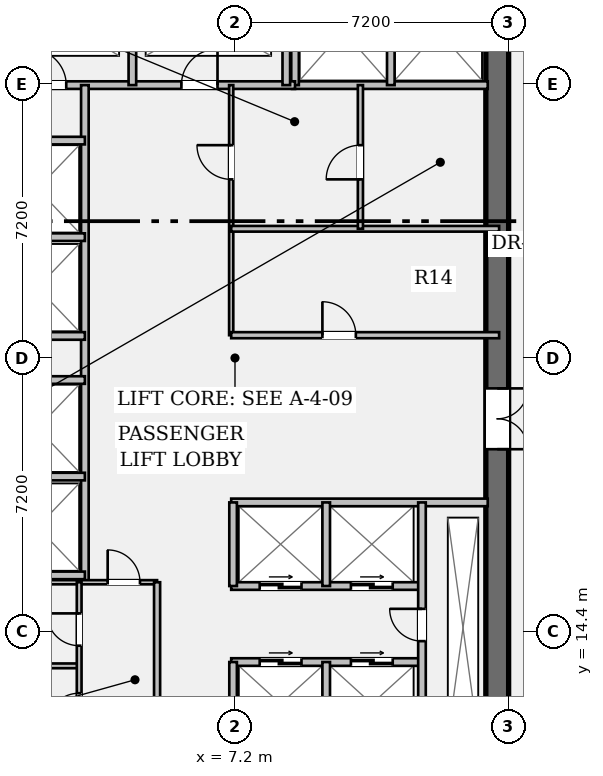
"""IFC4 building model, lengths in metres.
Left out: names, types, materials, properties, quantities, classifications, styles, units other than length and angle.
Written with IfcOpenShell. Run it as: python <this file> out.ifc"""

import sys

from ifc_helpers import new_model, si_unit, direction, frame, frame_2d, origin, place, context, subcontext, project, spatial, rectangle, extrude, element, fill, save


model = new_model("IFC4")
c1 = context("Model", 3, precision=1e-05, world=origin(), true_north=direction((0.0, 1.0)))
c2 = subcontext(c1, "Body", "Model", "MODEL_VIEW")
j1 = project(units=[si_unit("LENGTHUNIT", "METRE"), si_unit("PLANEANGLEUNIT", "RADIAN")], contexts=[c1])
p1 = place(None, origin())
s1 = spatial("IfcSite", under=j1, at=p1, CompositionType="ELEMENT")
p2 = place(p1, origin())
s2 = spatial("IfcBuilding", under=s1, at=p2, CompositionType="ELEMENT")
p3 = place(p2, frame((0.0, 0.0, 136.85)))
s3 = spatial("IfcBuildingStorey", under=s2, at=p3, CompositionType="ELEMENT", Elevation=136.85)
p4 = place(p3, frame((14.1, 35.4, 0.0), z_axis=(0.0, 0.0, 1.0), x_axis=(0.0, -1.0, 0.0)))
e1 = element("IfcWall", 1, at=p4, inside=s3, PredefinedType="SHEAR", context=c2, shape_type="SweptSolid", body=[
    extrude(rectangle(XDim=27.6, YDim=0.6, at=frame_2d((13.8, 0.0))), origin(), (0.0, 0.0, 1.0), 3.58),
])
p5 = place(p4, frame((1.3, 0.0, 0.0)))
e2 = element("IfcOpeningElement", 2, at=p5, cuts=e1, PredefinedType="OPENING", context=c2, shape_type="SweptSolid", body=[
    extrude(rectangle(XDim=1.2, YDim=2.15, at=frame_2d((0.6, 1.075))), frame((0.0, 0.312, 0.0), z_axis=(0.0, -1.0, 0.0), x_axis=(1.0, 0.0, 0.0)), (0.0, 0.0, 1.0), 0.624),
])
p6 = place(p4, frame((25.25, 0.0, 0.0)))
e3 = element("IfcOpeningElement", 3, at=p6, cuts=e1, PredefinedType="OPENING", context=c2, shape_type="SweptSolid", body=[
    extrude(rectangle(XDim=1.2, YDim=2.15, at=frame_2d((0.6, 1.075))), frame((0.0, 0.312, 0.0), z_axis=(0.0, -1.0, 0.0), x_axis=(1.0, 0.0, 0.0)), (0.0, 0.0, 1.0), 0.624),
])
p7 = place(p4, frame((14.6, 0.0, 0.0)))
e4 = element("IfcOpeningElement", 4, at=p7, cuts=e1, PredefinedType="OPENING", context=c2, shape_type="SweptSolid", body=[
    extrude(rectangle(XDim=1.6, YDim=2.2, at=frame_2d((0.8, 1.1))), frame((0.0, 0.312, 0.0), z_axis=(0.0, -1.0, 0.0), x_axis=(1.0, 0.0, 0.0)), (0.0, 0.0, 1.0), 0.624),
])
p8 = place(p3, frame((8.7, 28.78, 0.0), z_axis=(0.0, 0.0, 1.0), x_axis=(1.0, 0.0, 0.0)))
e5 = element("IfcWall", 5, at=p8, inside=s3, PredefinedType="PARTITIONING", context=c2, shape_type="SweptSolid", body=[
    extrude(rectangle(XDim=5.15, YDim=0.2, at=frame_2d((2.575, 0.0))), origin(), (0.0, 0.0, 1.0), 3.58),
])
for number, where, z_axis, x_axis in (
    (6, (8.78, 28.78, 0.0), (0.0, 0.0, 1.0), (0.0, 1.0, 0.0)),
    (7, (11.3, 28.78, 0.0), (0.0, 0.0, 1.0), (0.0, 1.0, 0.0)),
):
    element("IfcWall", number, at=place(p3, frame(where, z_axis=z_axis, x_axis=x_axis)), inside=s3, PredefinedType="PARTITIONING", context=c2, shape_type="SweptSolid", body=[
        extrude(rectangle(XDim=3.1, YDim=0.2, at=frame_2d((1.55, 0.0))), origin(), (0.0, 0.0, 1.0), 3.58),
    ])
p9 = place(p3, frame((0.6, 28.78, 0.0), z_axis=(0.0, 0.0, 1.0), x_axis=(1.0, 0.0, 0.0)))
e8 = element("IfcWall", 8, at=p9, inside=s3, PredefinedType="PARTITIONING", context=c2, shape_type="SweptSolid", body=[
    extrude(rectangle(XDim=8.18, YDim=0.2, at=frame_2d((4.09, 0.0))), origin(), (0.0, 0.0, 1.0), 3.58),
])
p10 = place(p9, frame((1.21, 0.0, 0.0)))
e9 = element("IfcOpeningElement", 9, at=p10, cuts=e8, PredefinedType="OPENING", context=c2, shape_type="SweptSolid", body=[
    extrude(rectangle(XDim=0.95, YDim=2.15, at=frame_2d((0.475, 1.075))), frame((0.0, 0.112, 0.0), z_axis=(0.0, -1.0, 0.0), x_axis=(1.0, 0.0, 0.0)), (0.0, 0.0, 1.0), 0.224),
])
p11 = place(p9, frame((5.19, 0.0, 0.0)))
e10 = element("IfcOpeningElement", 10, at=p11, cuts=e8, PredefinedType="OPENING", context=c2, shape_type="SweptSolid", body=[
    extrude(rectangle(XDim=0.95, YDim=2.15, at=frame_2d((0.475, 1.075))), frame((0.0, 0.112, 0.0), z_axis=(0.0, -1.0, 0.0), x_axis=(1.0, 0.0, 0.0)), (0.0, 0.0, 1.0), 0.224),
])
for number, where, z_axis, x_axis in (
    (11, (4.5, 28.78, 0.0), (0.0, 0.0, 1.0), (0.0, 1.0, 0.0)),
    (12, (8.55, 28.78, 0.0), (0.0, 0.0, 1.0), (0.0, 1.0, 0.0)),
):
    element("IfcWall", number, at=place(p3, frame(where, z_axis=z_axis, x_axis=x_axis)), inside=s3, PredefinedType="PARTITIONING", context=c2, shape_type="SweptSolid", body=[
        extrude(rectangle(XDim=2.94, YDim=0.2, at=frame_2d((1.47, 0.0))), origin(), (0.0, 0.0, 1.0), 3.58),
    ])
p12 = place(p3, frame((3.25, 15.7, 0.0), z_axis=(0.0, 0.0, 1.0), x_axis=(0.0, 1.0, 0.0)))
e13 = element("IfcWall", 13, at=p12, inside=s3, PredefinedType="PARTITIONING", context=c2, shape_type="SweptSolid", body=[
    extrude(rectangle(XDim=13.08, YDim=0.2, at=frame_2d((6.54, 0.0))), origin(), (0.0, 0.0, 1.0), 3.58),
])
for number, where, z_axis, x_axis in (
    (14, (0.6, 15.88, 0.0), (0.0, 0.0, 1.0), (1.0, 0.0, 0.0)),
    (15, (0.6, 18.48, 0.0), (0.0, 0.0, 1.0), (1.0, 0.0, 0.0)),
    (16, (0.6, 22.18, 0.0), (0.0, 0.0, 1.0), (1.0, 0.0, 0.0)),
    (17, (0.6, 24.78, 0.0), (0.0, 0.0, 1.0), (1.0, 0.0, 0.0)),
    (18, (0.6, 21.02, 0.0), (0.0, 0.0, 1.0), (1.0, 0.0, 0.0)),
    (19, (0.6, 27.32, 0.0), (0.0, 0.0, 1.0), (1.0, 0.0, 0.0)),
):
    element("IfcWall", number, at=place(p3, frame(where, z_axis=z_axis, x_axis=x_axis)), inside=s3, PredefinedType="PARTITIONING", context=c2, shape_type="SweptSolid", body=[
        extrude(rectangle(XDim=2.65, YDim=0.2, at=frame_2d((1.325, 0.0))), origin(), (0.0, 0.0, 1.0), 3.58),
    ])
p13 = place(p3, frame((7.1, 22.2, 0.0), z_axis=(0.0, 0.0, 1.0), x_axis=(0.0, 1.0, 0.0)))
e20 = element("IfcWall", 20, at=p13, inside=s3, PredefinedType="PARTITIONING", context=c2, shape_type="SweptSolid", body=[
    extrude(rectangle(XDim=6.58, YDim=0.11, at=frame_2d((3.29, 0.0))), origin(), (0.0, 0.0, 1.0), 3.58),
])
p14 = place(p13, frame((4.1, 0.0, 0.0)))
e21 = element("IfcOpeningElement", 21, at=p14, cuts=e20, PredefinedType="OPENING", context=c2, shape_type="SweptSolid", body=[
    extrude(rectangle(XDim=0.9, YDim=2.15, at=frame_2d((0.45, 1.075))), frame((0.0, 0.067, 0.0), z_axis=(0.0, -1.0, 0.0), x_axis=(1.0, 0.0, 0.0)), (0.0, 0.0, 1.0), 0.134),
])
p15 = place(p3, frame((7.1, 22.2, 0.0), z_axis=(0.0, 0.0, 1.0), x_axis=(1.0, 0.0, 0.0)))
e22 = element("IfcWall", 22, at=p15, inside=s3, PredefinedType="PARTITIONING", context=c2, shape_type="SweptSolid", body=[
    extrude(rectangle(XDim=7.05, YDim=0.16, at=frame_2d((3.525, 0.0))), origin(), (0.0, 0.0, 1.0), 3.58),
])
p16 = place(p15, frame((2.4, 0.0, 0.0)))
e23 = element("IfcOpeningElement", 23, at=p16, cuts=e22, PredefinedType="OPENING", context=c2, shape_type="SweptSolid", body=[
    extrude(rectangle(XDim=0.88, YDim=2.15, at=frame_2d((0.44, 1.075))), frame((0.0, 0.092, 0.0), z_axis=(0.0, -1.0, 0.0), x_axis=(1.0, 0.0, 0.0)), (0.0, 0.0, 1.0), 0.184),
])
p17 = place(p3, frame((7.1, 25.0, 0.0), z_axis=(0.0, 0.0, 1.0), x_axis=(1.0, 0.0, 0.0)))
e24 = element("IfcWall", 24, at=p17, inside=s3, PredefinedType="PARTITIONING", context=c2, shape_type="SweptSolid", body=[
    extrude(rectangle(XDim=7.05, YDim=0.15, at=frame_2d((3.525, 0.0))), origin(), (0.0, 0.0, 1.0), 3.58),
])
p18 = place(p3, frame((10.5, 25.0, 0.0), z_axis=(0.0, 0.0, 1.0), x_axis=(0.0, 1.0, 0.0)))
e25 = element("IfcWall", 25, at=p18, inside=s3, PredefinedType="PARTITIONING", context=c2, shape_type="SweptSolid", body=[
    extrude(rectangle(XDim=3.78, YDim=0.135, at=frame_2d((1.89, 0.0))), origin(), (0.0, 0.0, 1.0), 3.58),
])
p19 = place(p18, frame((1.3, 0.0, 0.0)))
e26 = element("IfcOpeningElement", 26, at=p19, cuts=e25, PredefinedType="OPENING", context=c2, shape_type="SweptSolid", body=[
    extrude(rectangle(XDim=0.9, YDim=2.15, at=frame_2d((0.45, 1.075))), frame((0.0, 0.08, 0.0), z_axis=(0.0, -1.0, 0.0), x_axis=(1.0, 0.0, 0.0)), (0.0, 0.0, 1.0), 0.159),
])
p20 = place(p3, frame((7.1, 17.8, 0.0), z_axis=(0.0, 0.0, 1.0), x_axis=(1.0, 0.0, 0.0)))
e27 = element("IfcWall", 27, at=p20, inside=s3, PredefinedType="PARTITIONING", context=c2, shape_type="SweptSolid", body=[
    extrude(rectangle(XDim=6.75, YDim=0.2, at=frame_2d((3.375, 0.0))), origin(), (0.0, 0.0, 1.0), 3.58),
])
p21 = place(p3, frame((7.1, 15.6, 0.0), z_axis=(0.0, 0.0, 1.0), x_axis=(1.0, 0.0, 0.0)))
e28 = element("IfcWall", 28, at=p21, inside=s3, PredefinedType="PARTITIONING", context=c2, shape_type="SweptSolid", body=[
    extrude(rectangle(XDim=5.02, YDim=0.2, at=frame_2d((2.51, 0.0))), origin(), (0.0, 0.0, 1.0), 3.58),
])
p22 = place(p21, frame((0.75, 0.0, 0.0)))
e29 = element("IfcOpeningElement", 29, at=p22, cuts=e28, PredefinedType="OPENING", context=c2, shape_type="SweptSolid", body=[
    extrude(rectangle(XDim=1.1, YDim=2.2, at=frame_2d((0.55, 1.1))), frame((0.0, 0.112, 0.0), z_axis=(0.0, -1.0, 0.0), x_axis=(1.0, 0.0, 0.0)), (0.0, 0.0, 1.0), 0.224),
])
p23 = place(p21, frame((3.15, 0.0, 0.0)))
e30 = element("IfcOpeningElement", 30, at=p23, cuts=e28, PredefinedType="OPENING", context=c2, shape_type="SweptSolid", body=[
    extrude(rectangle(XDim=1.1, YDim=2.2, at=frame_2d((0.55, 1.1))), frame((0.0, 0.112, 0.0), z_axis=(0.0, -1.0, 0.0), x_axis=(1.0, 0.0, 0.0)), (0.0, 0.0, 1.0), 0.224),
])
p24 = place(p3, frame((7.1, 13.6, 0.0), z_axis=(0.0, 0.0, 1.0), x_axis=(1.0, 0.0, 0.0)))
e31 = element("IfcWall", 31, at=p24, inside=s3, PredefinedType="PARTITIONING", context=c2, shape_type="SweptSolid", body=[
    extrude(rectangle(XDim=5.02, YDim=0.2, at=frame_2d((2.51, 0.0))), origin(), (0.0, 0.0, 1.0), 3.58),
])
p25 = place(p24, frame((0.75, 0.0, 0.0)))
e32 = element("IfcOpeningElement", 32, at=p25, cuts=e31, PredefinedType="OPENING", context=c2, shape_type="SweptSolid", body=[
    extrude(rectangle(XDim=1.1, YDim=2.2, at=frame_2d((0.55, 1.1))), frame((0.0, 0.112, 0.0), z_axis=(0.0, -1.0, 0.0), x_axis=(1.0, 0.0, 0.0)), (0.0, 0.0, 1.0), 0.224),
])
p26 = place(p24, frame((3.15, 0.0, 0.0)))
e33 = element("IfcOpeningElement", 33, at=p26, cuts=e31, PredefinedType="OPENING", context=c2, shape_type="SweptSolid", body=[
    extrude(rectangle(XDim=1.1, YDim=2.2, at=frame_2d((0.55, 1.1))), frame((0.0, 0.112, 0.0), z_axis=(0.0, -1.0, 0.0), x_axis=(1.0, 0.0, 0.0)), (0.0, 0.0, 1.0), 0.224),
])
p27 = place(p3, frame((7.15, 15.6, 0.0), z_axis=(0.0, 0.0, 1.0), x_axis=(0.0, 1.0, 0.0)))
e34 = element("IfcWall", 34, at=p27, inside=s3, PredefinedType="PARTITIONING", context=c2, shape_type="SweptSolid", body=[
    extrude(rectangle(XDim=2.2, YDim=0.2, at=frame_2d((1.1, 0.0))), origin(), (0.0, 0.0, 1.0), 3.58),
])
p28 = place(p3, frame((7.15, 11.2, 0.0), z_axis=(0.0, 0.0, 1.0), x_axis=(0.0, 1.0, 0.0)))
e35 = element("IfcWall", 35, at=p28, inside=s3, PredefinedType="PARTITIONING", context=c2, shape_type="SweptSolid", body=[
    extrude(rectangle(XDim=2.4, YDim=0.2, at=frame_2d((1.2, 0.0))), origin(), (0.0, 0.0, 1.0), 3.58),
])
p29 = place(p3, frame((9.6, 15.6, 0.0), z_axis=(0.0, 0.0, 1.0), x_axis=(0.0, 1.0, 0.0)))
e36 = element("IfcWall", 36, at=p29, inside=s3, PredefinedType="PARTITIONING", context=c2, shape_type="SweptSolid", body=[
    extrude(rectangle(XDim=2.2, YDim=0.2, at=frame_2d((1.1, 0.0))), origin(), (0.0, 0.0, 1.0), 3.58),
])
p30 = place(p3, frame((9.6, 11.2, 0.0), z_axis=(0.0, 0.0, 1.0), x_axis=(0.0, 1.0, 0.0)))
e37 = element("IfcWall", 37, at=p30, inside=s3, PredefinedType="PARTITIONING", context=c2, shape_type="SweptSolid", body=[
    extrude(rectangle(XDim=2.4, YDim=0.2, at=frame_2d((1.2, 0.0))), origin(), (0.0, 0.0, 1.0), 3.58),
])
p31 = place(p3, frame((12.12, 11.2, 0.0), z_axis=(0.0, 0.0, 1.0), x_axis=(0.0, 1.0, 0.0)))
e38 = element("IfcWall", 38, at=p31, inside=s3, PredefinedType="PARTITIONING", context=c2, shape_type="SweptSolid", body=[
    extrude(rectangle(XDim=6.6, YDim=0.2, at=frame_2d((3.3, 0.0))), origin(), (0.0, 0.0, 1.0), 3.58),
])
p32 = place(p31, frame((2.95, 0.0, 0.0)))
e39 = element("IfcOpeningElement", 39, at=p32, cuts=e38, PredefinedType="OPENING", context=c2, shape_type="SweptSolid", body=[
    extrude(rectangle(XDim=0.85, YDim=2.15, at=frame_2d((0.425, 1.075))), frame((0.0, 0.112, 0.0), z_axis=(0.0, -1.0, 0.0), x_axis=(1.0, 0.0, 0.0)), (0.0, 0.0, 1.0), 0.224),
])
p33 = place(p3, frame((0.6, 15.7, 0.0), z_axis=(0.0, 0.0, 1.0), x_axis=(1.0, 0.0, 0.0)))
e40 = element("IfcWall", 40, at=p33, inside=s3, PredefinedType="PARTITIONING", context=c2, shape_type="SweptSolid", body=[
    extrude(rectangle(XDim=4.55, YDim=0.11, at=frame_2d((2.275, 0.0))), origin(), (0.0, 0.0, 1.0), 3.58),
])
p34 = place(p33, frame((3.25, 0.0, 0.0)))
e41 = element("IfcOpeningElement", 41, at=p34, cuts=e40, PredefinedType="OPENING", context=c2, shape_type="SweptSolid", body=[
    extrude(rectangle(XDim=0.85, YDim=2.15, at=frame_2d((0.425, 1.075))), frame((0.0, 0.067, 0.0), z_axis=(0.0, -1.0, 0.0), x_axis=(1.0, 0.0, 0.0)), (0.0, 0.0, 1.0), 0.134),
])
p35 = place(p3, frame((5.15, 11.28, 0.0), z_axis=(0.0, 0.0, 1.0), x_axis=(0.0, 1.0, 0.0)))
e42 = element("IfcWall", 42, at=p35, inside=s3, PredefinedType="PARTITIONING", context=c2, shape_type="SweptSolid", body=[
    extrude(rectangle(XDim=4.42, YDim=0.16, at=frame_2d((2.21, 0.0))), origin(), (0.0, 0.0, 1.0), 3.58),
])
p36 = place(p3, frame((0.6, 13.5, 0.0), z_axis=(0.0, 0.0, 1.0), x_axis=(1.0, 0.0, 0.0)))
e43 = element("IfcWall", 43, at=p36, inside=s3, PredefinedType="PARTITIONING", context=c2, shape_type="SweptSolid", body=[
    extrude(rectangle(XDim=2.5, YDim=0.125, at=frame_2d((1.25, 0.0))), origin(), (0.0, 0.0, 1.0), 3.58),
])
p37 = place(p3, frame((3.1, 11.28, 0.0), z_axis=(0.0, 0.0, 1.0), x_axis=(0.0, 1.0, 0.0)))
e44 = element("IfcWall", 44, at=p37, inside=s3, PredefinedType="PARTITIONING", context=c2, shape_type="SweptSolid", body=[
    extrude(rectangle(XDim=4.42, YDim=0.125, at=frame_2d((2.21, 0.0))), origin(), (0.0, 0.0, 1.0), 3.58),
])
p38 = place(p37, frame((0.65, 0.0, 0.0)))
e45 = element("IfcOpeningElement", 45, at=p38, cuts=e44, PredefinedType="OPENING", context=c2, shape_type="SweptSolid", body=[
    extrude(rectangle(XDim=0.85, YDim=2.15, at=frame_2d((0.425, 1.075))), frame((0.0, 0.074, 0.0), z_axis=(0.0, -1.0, 0.0), x_axis=(1.0, 0.0, 0.0)), (0.0, 0.0, 1.0), 0.149),
])
p39 = place(p37, frame((2.75, 0.0, 0.0)))
e46 = element("IfcOpeningElement", 46, at=p39, cuts=e44, PredefinedType="OPENING", context=c2, shape_type="SweptSolid", body=[
    extrude(rectangle(XDim=0.85, YDim=2.15, at=frame_2d((0.425, 1.075))), frame((0.0, 0.074, 0.0), z_axis=(0.0, -1.0, 0.0), x_axis=(1.0, 0.0, 0.0)), (0.0, 0.0, 1.0), 0.149),
])
p40 = place(p10, origin())
e47 = element("IfcDoor", 47, at=p40, inside=s3, OperationType="SINGLE_SWING_LEFT", PredefinedType="DOOR", context=c2, shape_type="SweptSolid", body=[
    extrude(rectangle(XDim=0.95, YDim=2.15, at=frame_2d((0.475, 1.075))), frame((0.0, 0.025, 0.0), z_axis=(0.0, -1.0, 0.0), x_axis=(1.0, 0.0, 0.0)), (0.0, 0.0, 1.0), 0.05),
])
fill(e9, e47)
p41 = place(p11, origin())
e48 = element("IfcDoor", 48, at=p41, inside=s3, OperationType="SINGLE_SWING_RIGHT", PredefinedType="DOOR", context=c2, shape_type="SweptSolid", body=[
    extrude(rectangle(XDim=0.95, YDim=2.15, at=frame_2d((0.475, 1.075))), frame((0.0, 0.025, 0.0), z_axis=(0.0, -1.0, 0.0), x_axis=(1.0, 0.0, 0.0)), (0.0, 0.0, 1.0), 0.05),
])
fill(e10, e48)
p42 = place(p7, origin())
e49 = element("IfcDoor", 49, at=p42, inside=s3, OperationType="DOUBLE_DOOR_SINGLE_SWING", PredefinedType="DOOR", context=c2, shape_type="SweptSolid", body=[
    extrude(rectangle(XDim=1.6, YDim=2.2, at=frame_2d((0.8, 1.1))), frame((0.0, 0.025, 0.0), z_axis=(0.0, -1.0, 0.0), x_axis=(1.0, 0.0, 0.0)), (0.0, 0.0, 1.0), 0.05),
])
fill(e4, e49)
p43 = place(p16, origin())
e50 = element("IfcDoor", 50, at=p43, inside=s3, OperationType="SINGLE_SWING_LEFT", PredefinedType="DOOR", context=c2, shape_type="SweptSolid", body=[
    extrude(rectangle(XDim=0.88, YDim=2.15, at=frame_2d((0.44, 1.075))), frame((0.0, 0.025, 0.0), z_axis=(0.0, -1.0, 0.0), x_axis=(1.0, 0.0, 0.0)), (0.0, 0.0, 1.0), 0.05),
])
fill(e23, e50)
p44 = place(p14, origin())
e51 = element("IfcDoor", 51, at=p44, inside=s3, OperationType="SINGLE_SWING_RIGHT", PredefinedType="DOOR", context=c2, shape_type="SweptSolid", body=[
    extrude(rectangle(XDim=0.9, YDim=2.15, at=frame_2d((0.45, 1.075))), frame((0.0, 0.025, 0.0), z_axis=(0.0, -1.0, 0.0), x_axis=(1.0, 0.0, 0.0)), (0.0, 0.0, 1.0), 0.05),
])
fill(e21, e51)
p45 = place(p19, origin())
e52 = element("IfcDoor", 52, at=p45, inside=s3, OperationType="SINGLE_SWING_LEFT", PredefinedType="DOOR", context=c2, shape_type="SweptSolid", body=[
    extrude(rectangle(XDim=0.9, YDim=2.15, at=frame_2d((0.45, 1.075))), frame((0.0, 0.025, 0.0), z_axis=(0.0, -1.0, 0.0), x_axis=(1.0, 0.0, 0.0)), (0.0, 0.0, 1.0), 0.05),
])
fill(e26, e52)
p46 = place(p32, origin())
e53 = element("IfcDoor", 53, at=p46, inside=s3, OperationType="SINGLE_SWING_RIGHT", PredefinedType="DOOR", context=c2, shape_type="SweptSolid", body=[
    extrude(rectangle(XDim=0.85, YDim=2.15, at=frame_2d((0.425, 1.075))), frame((0.0, 0.025, 0.0), z_axis=(0.0, -1.0, 0.0), x_axis=(1.0, 0.0, 0.0)), (0.0, 0.0, 1.0), 0.05),
])
fill(e39, e53)
p47 = place(p22, origin())
e54 = element("IfcDoor", 54, at=p47, inside=s3, OperationType="DOUBLE_DOOR_SLIDING", PredefinedType="DOOR", context=c2, shape_type="SweptSolid", body=[
    extrude(rectangle(XDim=1.1, YDim=2.2, at=frame_2d((0.55, 1.1))), frame((0.0, 0.025, 0.0), z_axis=(0.0, -1.0, 0.0), x_axis=(1.0, 0.0, 0.0)), (0.0, 0.0, 1.0), 0.05),
])
fill(e29, e54)
p48 = place(p23, origin())
e55 = element("IfcDoor", 55, at=p48, inside=s3, OperationType="DOUBLE_DOOR_SLIDING", PredefinedType="DOOR", context=c2, shape_type="SweptSolid", body=[
    extrude(rectangle(XDim=1.1, YDim=2.2, at=frame_2d((0.55, 1.1))), frame((0.0, 0.025, 0.0), z_axis=(0.0, -1.0, 0.0), x_axis=(1.0, 0.0, 0.0)), (0.0, 0.0, 1.0), 0.05),
])
fill(e30, e55)
p49 = place(p25, origin())
e56 = element("IfcDoor", 56, at=p49, inside=s3, OperationType="DOUBLE_DOOR_SLIDING", PredefinedType="DOOR", context=c2, shape_type="SweptSolid", body=[
    extrude(rectangle(XDim=1.1, YDim=2.2, at=frame_2d((0.55, 1.1))), frame((0.0, 0.025, 0.0), z_axis=(0.0, -1.0, 0.0), x_axis=(1.0, 0.0, 0.0)), (0.0, 0.0, 1.0), 0.05),
])
fill(e32, e56)
p50 = place(p26, origin())
e57 = element("IfcDoor", 57, at=p50, inside=s3, OperationType="DOUBLE_DOOR_SLIDING", PredefinedType="DOOR", context=c2, shape_type="SweptSolid", body=[
    extrude(rectangle(XDim=1.1, YDim=2.2, at=frame_2d((0.55, 1.1))), frame((0.0, 0.025, 0.0), z_axis=(0.0, -1.0, 0.0), x_axis=(1.0, 0.0, 0.0)), (0.0, 0.0, 1.0), 0.05),
])
fill(e33, e57)
p51 = place(p34, origin())
e58 = element("IfcDoor", 58, at=p51, inside=s3, OperationType="SINGLE_SWING_LEFT", PredefinedType="DOOR", context=c2, shape_type="SweptSolid", body=[
    extrude(rectangle(XDim=0.85, YDim=2.15, at=frame_2d((0.425, 1.075))), frame((0.0, 0.025, 0.0), z_axis=(0.0, -1.0, 0.0), x_axis=(1.0, 0.0, 0.0)), (0.0, 0.0, 1.0), 0.05),
])
fill(e41, e58)
p52 = place(p38, origin())
e59 = element("IfcDoor", 59, at=p52, inside=s3, OperationType="SINGLE_SWING_LEFT", PredefinedType="DOOR", context=c2, shape_type="SweptSolid", body=[
    extrude(rectangle(XDim=0.85, YDim=2.15, at=frame_2d((0.425, 1.075))), frame((0.0, 0.025, 0.0), z_axis=(0.0, -1.0, 0.0), x_axis=(1.0, 0.0, 0.0)), (0.0, 0.0, 1.0), 0.05),
])
fill(e45, e59)
p53 = place(p39, origin())
e60 = element("IfcDoor", 60, at=p53, inside=s3, OperationType="SINGLE_SWING_RIGHT", PredefinedType="DOOR", context=c2, shape_type="SweptSolid", body=[
    extrude(rectangle(XDim=0.85, YDim=2.15, at=frame_2d((0.425, 1.075))), frame((0.0, 0.025, 0.0), z_axis=(0.0, -1.0, 0.0), x_axis=(1.0, 0.0, 0.0)), (0.0, 0.0, 1.0), 0.05),
])
fill(e46, e60)
save(model, sys.argv[1])
